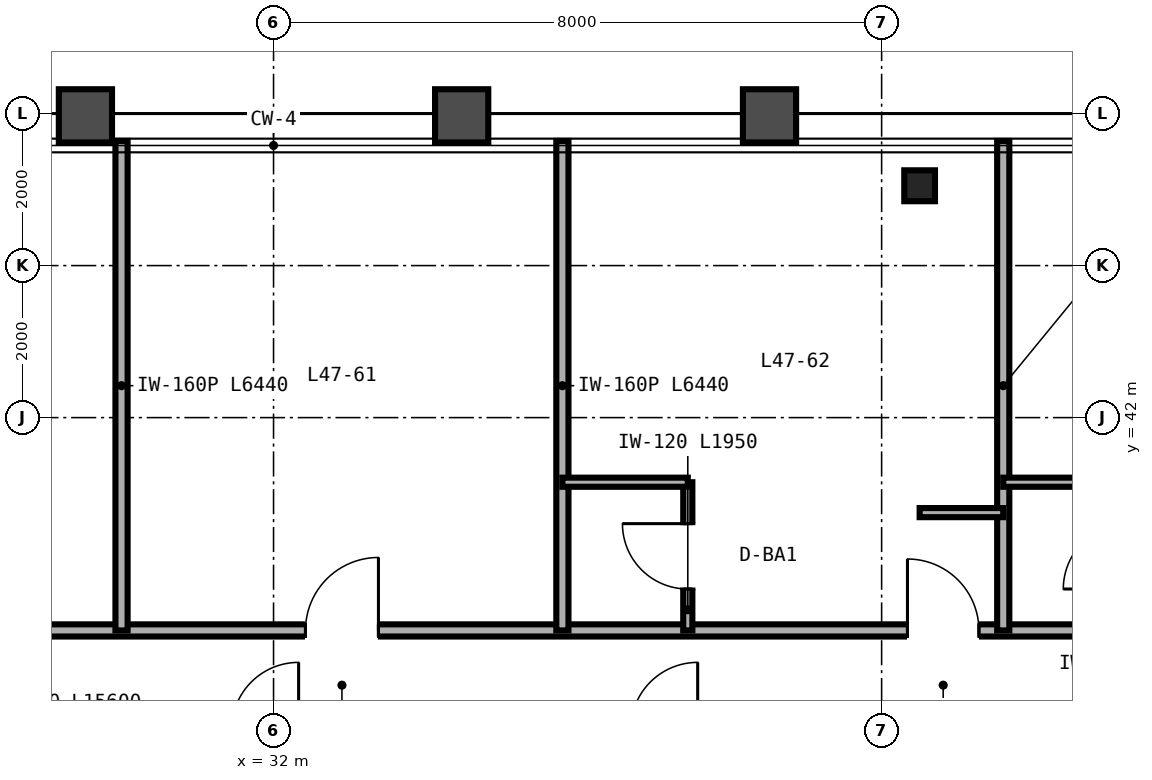
"""IFC4 building model, lengths in metres.
Left out: names, types, materials, properties, quantities, classifications, styles, units other than length and angle.
Written with IfcOpenShell. Run it as: python <this file> out.ifc"""

import sys

from ifc_helpers import new_model, si_unit, direction, frame, frame_2d, origin, origin_2d, place, context, subcontext, project, spatial, rectangle, i_section, extrude, source, transform, mapped, element, fill, save


model = new_model("IFC4")
c1 = context("Model", 3, precision=1e-05, world=origin(), true_north=direction((0.0, 1.0)))
c2 = subcontext(c1, "Body", "Model", "MODEL_VIEW")
j1 = project(units=[si_unit("LENGTHUNIT", "METRE"), si_unit("PLANEANGLEUNIT", "RADIAN")], contexts=[c1])
p1 = place(None, origin())
s1 = spatial("IfcSite", under=j1, at=p1, CompositionType="ELEMENT")
p2 = place(p1, origin())
s2 = spatial("IfcBuilding", under=s1, at=p2, CompositionType="ELEMENT")
p3 = place(p2, frame((0.0, 0.0, 188.4)))
s3 = spatial("IfcBuildingStorey", under=s2, at=p3, CompositionType="ELEMENT", Elevation=188.4)
m1 = source(origin(), c2, "Body", "SweptSolid", [
    extrude(i_section(OverallWidth=0.404, OverallDepth=0.407, WebThickness=0.027, FlangeThickness=0.044, FilletRadius=0.025, at=origin_2d()), origin(), (0.0, 0.0, 1.0), 3.37),
])
p4 = place(p3, frame((40.5, 45.05, 0.0), z_axis=(0.0, 0.0, 1.0), x_axis=(1.0, 0.0, 0.0)))
e1 = element("IfcColumn", 1, at=p4, inside=s3, PredefinedType="COLUMN", context=c2, shape_type="MappedRepresentation", body=[
    mapped(m1, transform((0.0, 0.0, 0.0), scale=1.0)),
])
p5 = place(p3, frame((14.0, 39.2, 0.0), z_axis=(0.0, 0.0, 1.0), x_axis=(1.0, 0.0, 0.0)))
e2 = element("IfcWall", 2, at=p5, inside=s3, PredefinedType="PARTITIONING", context=c2, shape_type="SweptSolid", body=[
    extrude(rectangle(XDim=36.0, YDim=0.16, at=frame_2d((18.0, 0.0))), origin(), (0.0, 0.0, 1.0), 2.913),
])
p6 = place(p5, frame((3.94, 0.0, 0.0)))
e3 = element("IfcOpeningElement", 3, at=p6, cuts=e2, PredefinedType="OPENING", context=c2, shape_type="SweptSolid", body=[
    extrude(rectangle(XDim=0.94, YDim=2.15, at=frame_2d((0.47, 1.075))), frame((0.0, 0.09, 0.0), z_axis=(0.0, -1.0, 0.0), x_axis=(1.0, 0.0, 0.0)), (0.0, 0.0, 1.0), 0.18),
])
p7 = place(p5, frame((9.14, 0.0, 0.0)))
e4 = element("IfcOpeningElement", 4, at=p7, cuts=e2, PredefinedType="OPENING", context=c2, shape_type="SweptSolid", body=[
    extrude(rectangle(XDim=0.94, YDim=2.15, at=frame_2d((0.47, 1.075))), frame((0.0, 0.09, 0.0), z_axis=(0.0, -1.0, 0.0), x_axis=(1.0, 0.0, 0.0)), (0.0, 0.0, 1.0), 0.18),
])
p8 = place(p5, frame((12.72, 0.0, 0.0)))
e5 = element("IfcOpeningElement", 5, at=p8, cuts=e2, PredefinedType="OPENING", context=c2, shape_type="SweptSolid", body=[
    extrude(rectangle(XDim=0.96, YDim=2.15, at=frame_2d((0.48, 1.075))), frame((0.0, 0.09, 0.0), z_axis=(0.0, -1.0, 0.0), x_axis=(1.0, 0.0, 0.0)), (0.0, 0.0, 1.0), 0.18),
])
p9 = place(p5, frame((18.42, 0.0, 0.0)))
e6 = element("IfcOpeningElement", 6, at=p9, cuts=e2, PredefinedType="OPENING", context=c2, shape_type="SweptSolid", body=[
    extrude(rectangle(XDim=0.96, YDim=2.15, at=frame_2d((0.48, 1.075))), frame((0.0, 0.09, 0.0), z_axis=(0.0, -1.0, 0.0), x_axis=(1.0, 0.0, 0.0)), (0.0, 0.0, 1.0), 0.18),
])
p10 = place(p5, frame((26.34, 0.0, 0.0)))
e7 = element("IfcOpeningElement", 7, at=p10, cuts=e2, PredefinedType="OPENING", context=c2, shape_type="SweptSolid", body=[
    extrude(rectangle(XDim=0.94, YDim=2.15, at=frame_2d((0.47, 1.075))), frame((0.0, 0.09, 0.0), z_axis=(0.0, -1.0, 0.0), x_axis=(1.0, 0.0, 0.0)), (0.0, 0.0, 1.0), 0.18),
])
p11 = place(p5, frame((30.54, 0.0, 0.0)))
e8 = element("IfcOpeningElement", 8, at=p11, cuts=e2, PredefinedType="OPENING", context=c2, shape_type="SweptSolid", body=[
    extrude(rectangle(XDim=0.94, YDim=2.15, at=frame_2d((0.47, 1.075))), frame((0.0, 0.09, 0.0), z_axis=(0.0, -1.0, 0.0), x_axis=(1.0, 0.0, 0.0)), (0.0, 0.0, 1.0), 0.18),
])
p12 = place(p5, frame((34.74, 0.0, 0.0)))
e9 = element("IfcOpeningElement", 9, at=p12, cuts=e2, PredefinedType="OPENING", context=c2, shape_type="SweptSolid", body=[
    extrude(rectangle(XDim=0.94, YDim=2.15, at=frame_2d((0.47, 1.075))), frame((0.0, 0.09, 0.0), z_axis=(0.0, -1.0, 0.0), x_axis=(1.0, 0.0, 0.0)), (0.0, 0.0, 1.0), 0.18),
])
for number, where, z_axis, x_axis in (
    (10, (30.0, 39.2, 0.0), (0.0, 0.0, 1.0), (0.0, 1.0, 0.0)),
    (11, (35.8, 39.2, 0.0), (0.0, 0.0, 1.0), (0.0, 1.0, 0.0)),
):
    element("IfcWall", number, at=place(p3, frame(where, z_axis=z_axis, x_axis=x_axis)), inside=s3, PredefinedType="PARTITIONING", context=c2, shape_type="SweptSolid", body=[
        extrude(rectangle(XDim=6.44, YDim=0.16, at=frame_2d((3.22, 0.0))), origin(), (0.0, 0.0, 1.0), 2.443),
    ])
p13 = place(p3, frame((41.6, 39.2, 0.0), z_axis=(0.0, 0.0, 1.0), x_axis=(0.0, 1.0, 0.0)))
e12 = element("IfcWall", 12, at=p13, inside=s3, PredefinedType="PARTITIONING", context=c2, shape_type="SweptSolid", body=[
    extrude(rectangle(XDim=6.44, YDim=0.16, at=frame_2d((3.22, 0.0))), origin(), (0.0, 0.0, 1.0), 2.833),
])
p14 = place(p3, frame((37.45, 39.2, 0.0), z_axis=(0.0, 0.0, 1.0), x_axis=(0.0, 1.0, 0.0)))
e13 = element("IfcWall", 13, at=p14, inside=s3, PredefinedType="PARTITIONING", context=c2, shape_type="SweptSolid", body=[
    extrude(rectangle(XDim=1.95, YDim=0.12, at=frame_2d((0.975, 0.0))), origin(), (0.0, 0.0, 1.0), 3.37),
])
p15 = place(p14, frame((0.545, 0.0, 0.0)))
e14 = element("IfcOpeningElement", 14, at=p15, cuts=e13, PredefinedType="OPENING", context=c2, shape_type="SweptSolid", body=[
    extrude(rectangle(XDim=0.86, YDim=2.1, at=frame_2d((0.43, 1.05))), frame((0.0, 0.07, 0.0), z_axis=(0.0, -1.0, 0.0), x_axis=(1.0, 0.0, 0.0)), (0.0, 0.0, 1.0), 0.14),
])
p16 = place(p3, frame((35.8, 41.15, 0.0), z_axis=(0.0, 0.0, 1.0), x_axis=(1.0, 0.0, 0.0)))
e15 = element("IfcWall", 15, at=p16, inside=s3, PredefinedType="PARTITIONING", context=c2, shape_type="SweptSolid", body=[
    extrude(rectangle(XDim=1.65, YDim=0.12, at=frame_2d((0.825, 0.0))), origin(), (0.0, 0.0, 1.0), 3.37),
])
p17 = place(p3, frame((40.5, 40.75, 0.0), z_axis=(0.0, 0.0, 1.0), x_axis=(1.0, 0.0, 0.0)))
e16 = element("IfcWall", 16, at=p17, inside=s3, PredefinedType="PARTITIONING", context=c2, shape_type="SweptSolid", body=[
    extrude(rectangle(XDim=1.1, YDim=0.12, at=frame_2d((0.55, 0.0))), origin(), (0.0, 0.0, 1.0), 2.913),
])
p18 = place(p3, frame((41.6, 41.15, 0.0), z_axis=(0.0, 0.0, 1.0), x_axis=(1.0, 0.0, 0.0)))
e17 = element("IfcWall", 17, at=p18, inside=s3, PredefinedType="PARTITIONING", context=c2, shape_type="SweptSolid", body=[
    extrude(rectangle(XDim=1.65, YDim=0.12, at=frame_2d((0.825, 0.0))), origin(), (0.0, 0.0, 1.0), 3.37),
])
m2 = source(origin(), c2, "Body", "SweptSolid", [
    extrude(rectangle(XDim=0.86, YDim=2.1, at=frame_2d((0.43, 1.05))), frame((0.0, 0.025, 0.0), z_axis=(0.0, -1.0, 0.0), x_axis=(1.0, 0.0, 0.0)), (0.0, 0.0, 1.0), 0.05),
])
p19 = place(p15, origin())
e18 = element("IfcDoor", 18, at=p19, inside=s3, OperationType="SINGLE_SWING_RIGHT", PredefinedType="DOOR", context=c2, shape_type="MappedRepresentation", body=[
    mapped(m2, transform((0.0, 0.0, 0.0), scale=1.0)),
])
fill(e14, e18)
m3 = source(origin(), c2, "Body", "SweptSolid", [
    extrude(rectangle(XDim=0.96, YDim=2.15, at=frame_2d((0.48, 1.075))), frame((0.0, 0.025, 0.0), z_axis=(0.0, -1.0, 0.0), x_axis=(1.0, 0.0, 0.0)), (0.0, 0.0, 1.0), 0.05),
])
p20 = place(p9, origin())
e19 = element("IfcDoor", 19, at=p20, inside=s3, OperationType="SINGLE_SWING_RIGHT", PredefinedType="DOOR", context=c2, shape_type="MappedRepresentation", body=[
    mapped(m3, transform((0.0, 0.0, 0.0), scale=1.0)),
])
fill(e6, e19)
m4 = source(origin(), c2, "Body", "SweptSolid", [
    extrude(rectangle(XDim=0.94, YDim=2.15, at=frame_2d((0.47, 1.075))), frame((0.0, 0.025, 0.0), z_axis=(0.0, -1.0, 0.0), x_axis=(1.0, 0.0, 0.0)), (0.0, 0.0, 1.0), 0.05),
])
p21 = place(p10, origin())
e20 = element("IfcDoor", 20, at=p21, inside=s3, OperationType="SINGLE_SWING_LEFT", PredefinedType="DOOR", context=c2, shape_type="MappedRepresentation", body=[
    mapped(m4, transform((0.0, 0.0, 0.0), scale=1.0)),
])
fill(e7, e20)
save(model, sys.argv[1])
